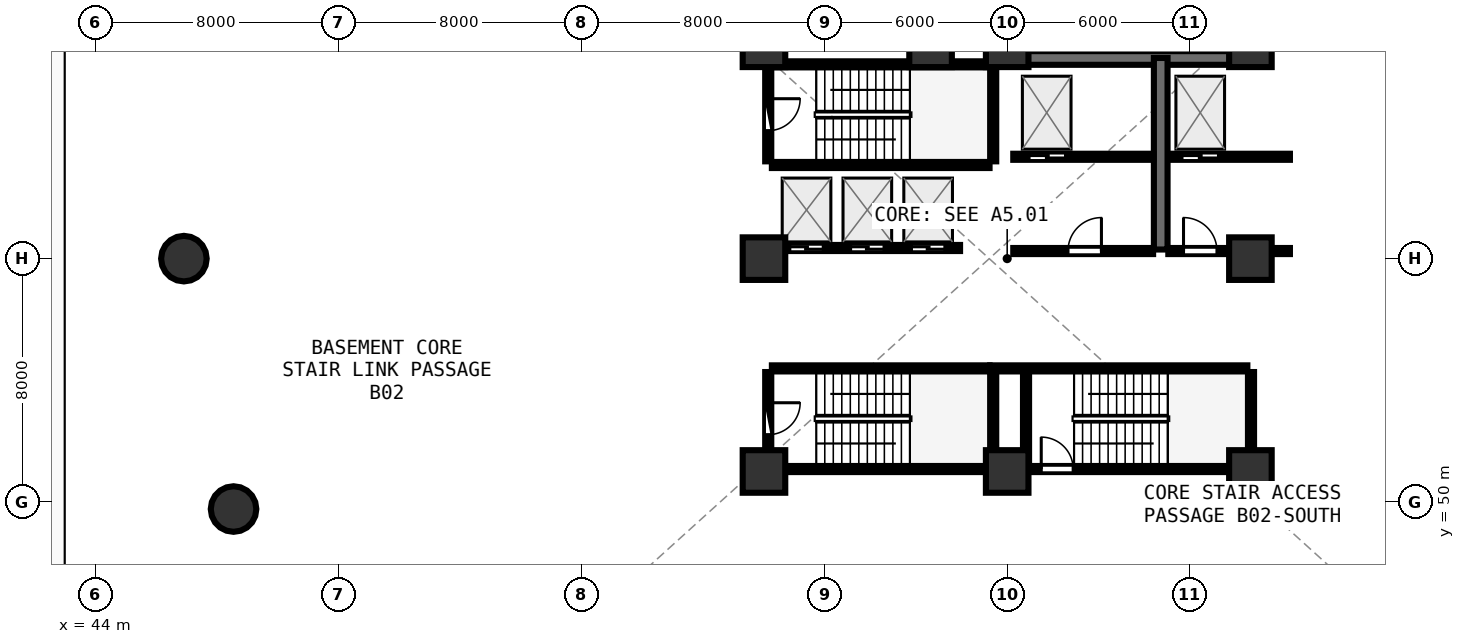
"""IFC4 building model, lengths in metres.
Left out: names, types, materials, properties, quantities, classifications, styles, units other than length and angle.
Written with IfcOpenShell. Run it as: python <this file> out.ifc"""

import sys

from ifc_helpers import new_model, si_unit, direction, frame, frame_2d, origin, origin_2d, place, context, subcontext, project, spatial, rectangle, circle, extrude, element, fill, save


model = new_model("IFC4")
c1 = context("Model", 3, precision=1e-05, world=origin(), true_north=direction((0.0, 1.0)))
c2 = subcontext(c1, "Body", "Model", "MODEL_VIEW")
j1 = project(units=[si_unit("LENGTHUNIT", "METRE"), si_unit("PLANEANGLEUNIT", "RADIAN")], contexts=[c1])
p1 = place(None, origin())
s1 = spatial("IfcSite", under=j1, at=p1, CompositionType="ELEMENT")
p2 = place(p1, origin())
s2 = spatial("IfcBuilding", under=s1, at=p2, CompositionType="ELEMENT")
p3 = place(p2, frame((0.0, 0.0, -8.4)))
s3 = spatial("IfcBuildingStorey", under=s2, at=p3, CompositionType="ELEMENT", Elevation=-8.4)
for number, where, z_axis, x_axis in (
    (1, (66.0, 51.0, 0.0), (0.0, 0.0, 1.0), (1.0, 0.0, 0.0)),
    (2, (74.0, 51.0, 0.0), (0.0, 0.0, 1.0), (1.0, 0.0, 0.0)),
    (3, (82.0, 51.0, 0.0), (0.0, 0.0, 1.0), (1.0, 0.0, 0.0)),
    (4, (82.0, 58.0, 0.0), (0.0, 0.0, 1.0), (1.0, 0.0, 0.0)),
    (5, (82.0, 65.0, 0.0), (0.0, 0.0, 1.0), (1.0, 0.0, 0.0)),
    (6, (74.0, 65.0, 0.0), (0.0, 0.0, 1.0), (1.0, 0.0, 0.0)),
    (7, (71.48, 65.0, 0.0), (0.0, 0.0, 1.0), (1.0, 0.0, 0.0)),
    (8, (66.0, 65.0, 0.0), (0.0, 0.0, 1.0), (1.0, 0.0, 0.0)),
    (9, (66.0, 58.0, 0.0), (0.0, 0.0, 1.0), (1.0, 0.0, 0.0)),
):
    element("IfcColumn", number, at=place(p3, frame(where, z_axis=z_axis, x_axis=x_axis)), inside=s3, PredefinedType="PILASTER", context=c2, shape_type="SweptSolid", body=[
        extrude(rectangle(XDim=1.4, YDim=1.4, at=origin_2d()), origin(), (0.0, 0.0, 1.0), 4.2),
    ])
for number, where, z_axis, x_axis in (
    (10, (46.92, 58.0, 0.0), (0.0, 0.0, 1.0), (1.0, 0.0, 0.0)),
    (11, (48.553, 49.764, 0.0), (0.0, 0.0, 1.0), (1.0, 0.0, 0.0)),
):
    element("IfcColumn", number, at=place(p3, frame(where, z_axis=z_axis, x_axis=x_axis)), inside=s3, PredefinedType="COLUMN", context=c2, shape_type="SweptSolid", body=[
        extrude(circle(Radius=0.75, at=origin_2d()), origin(), (0.0, 0.0, 1.0), 4.2),
    ])
p4 = place(p3, frame((66.26, 61.08, 0.0), z_axis=(0.0, 0.0, 1.0), x_axis=(1.0, 0.0, 0.0)))
e12 = element("IfcWall", 12, at=p4, inside=s3, PredefinedType="SHEAR", context=c2, shape_type="SweptSolid", body=[
    extrude(rectangle(XDim=7.16, YDim=0.2, at=frame_2d((3.58, 0.0))), origin(), (0.0, 0.0, 1.0), 3.9),
])
p5 = place(p3, frame((73.54, 61.2, 0.0), z_axis=(0.0, 0.0, 1.0), x_axis=(0.0, 1.0, 0.0)))
e13 = element("IfcWall", 13, at=p5, inside=s3, PredefinedType="SHEAR", context=c2, shape_type="SweptSolid", body=[
    extrude(rectangle(XDim=3.07, YDim=0.2, at=frame_2d((1.535, 0.0))), origin(), (0.0, 0.0, 1.0), 3.9),
])
p6 = place(p3, frame((73.42, 64.39, 0.0), z_axis=(0.0, 0.0, 1.0), x_axis=(-1.0, 0.0, 0.0)))
e14 = element("IfcWall", 14, at=p6, inside=s3, PredefinedType="SHEAR", context=c2, shape_type="SweptSolid", body=[
    extrude(rectangle(XDim=7.16, YDim=0.2, at=frame_2d((3.58, 0.0))), origin(), (0.0, 0.0, 1.0), 3.9),
])
p7 = place(p3, frame((66.14, 64.27, 0.0), z_axis=(0.0, 0.0, 1.0), x_axis=(0.0, -1.0, 0.0)))
e15 = element("IfcWall", 15, at=p7, inside=s3, PredefinedType="SHEAR", context=c2, shape_type="SweptSolid", body=[
    extrude(rectangle(XDim=3.07, YDim=0.2, at=frame_2d((1.535, 0.0))), origin(), (0.0, 0.0, 1.0), 3.9),
])
p8 = place(p7, frame((1.01, 0.0, 0.0)))
e16 = element("IfcOpeningElement", 16, at=p8, cuts=e15, PredefinedType="OPENING", context=c2, shape_type="SweptSolid", body=[
    extrude(rectangle(XDim=1.05, YDim=2.1, at=frame_2d((0.525, 1.05))), frame((0.0, 0.11, 0.0), z_axis=(0.0, -1.0, 0.0), x_axis=(1.0, 0.0, 0.0)), (0.0, 0.0, 1.0), 0.22),
])
p9 = place(p3, frame((74.0, 51.08, 0.0), z_axis=(0.0, 0.0, 1.0), x_axis=(1.0, 0.0, 0.0)))
e17 = element("IfcWall", 17, at=p9, inside=s3, PredefinedType="SHEAR", context=c2, shape_type="SweptSolid", body=[
    extrude(rectangle(XDim=7.9, YDim=0.2, at=frame_2d((3.95, 0.0))), origin(), (0.0, 0.0, 1.0), 3.9),
])
p10 = place(p9, frame((1.12, 0.0, 0.0)))
e18 = element("IfcOpeningElement", 18, at=p10, cuts=e17, PredefinedType="OPENING", context=c2, shape_type="SweptSolid", body=[
    extrude(rectangle(XDim=1.05, YDim=2.1, at=frame_2d((0.525, 1.05))), frame((0.0, 0.11, 0.0), z_axis=(0.0, -1.0, 0.0), x_axis=(1.0, 0.0, 0.0)), (0.0, 0.0, 1.0), 0.22),
])
p11 = place(p3, frame((82.02, 51.2, 0.0), z_axis=(0.0, 0.0, 1.0), x_axis=(0.0, 1.0, 0.0)))
e19 = element("IfcWall", 19, at=p11, inside=s3, PredefinedType="SHEAR", context=c2, shape_type="SweptSolid", body=[
    extrude(rectangle(XDim=3.07, YDim=0.2, at=frame_2d((1.535, 0.0))), origin(), (0.0, 0.0, 1.0), 3.9),
])
p12 = place(p3, frame((81.9, 54.39, 0.0), z_axis=(0.0, 0.0, 1.0), x_axis=(-1.0, 0.0, 0.0)))
e20 = element("IfcWall", 20, at=p12, inside=s3, PredefinedType="SHEAR", context=c2, shape_type="SweptSolid", body=[
    extrude(rectangle(XDim=8.46, YDim=0.2, at=frame_2d((4.23, 0.0))), origin(), (0.0, 0.0, 1.0), 3.9),
])
p13 = place(p3, frame((74.62, 54.27, 0.0), z_axis=(0.0, 0.0, 1.0), x_axis=(0.0, -1.0, 0.0)))
e21 = element("IfcWall", 21, at=p13, inside=s3, PredefinedType="SHEAR", context=c2, shape_type="SweptSolid", body=[
    extrude(rectangle(XDim=3.07, YDim=0.2, at=frame_2d((1.535, 0.0))), origin(), (0.0, 0.0, 1.0), 3.9),
])
p14 = place(p3, frame((66.26, 51.08, 0.0), z_axis=(0.0, 0.0, 1.0), x_axis=(1.0, 0.0, 0.0)))
e22 = element("IfcWall", 22, at=p14, inside=s3, PredefinedType="SHEAR", context=c2, shape_type="SweptSolid", body=[
    extrude(rectangle(XDim=7.16, YDim=0.2, at=frame_2d((3.58, 0.0))), origin(), (0.0, 0.0, 1.0), 3.9),
])
p15 = place(p3, frame((73.54, 51.2, 0.0), z_axis=(0.0, 0.0, 1.0), x_axis=(0.0, 1.0, 0.0)))
e23 = element("IfcWall", 23, at=p15, inside=s3, PredefinedType="SHEAR", context=c2, shape_type="SweptSolid", body=[
    extrude(rectangle(XDim=3.07, YDim=0.2, at=frame_2d((1.535, 0.0))), origin(), (0.0, 0.0, 1.0), 3.9),
])
p16 = place(p3, frame((73.42, 54.39, 0.0), z_axis=(0.0, 0.0, 1.0), x_axis=(-1.0, 0.0, 0.0)))
e24 = element("IfcWall", 24, at=p16, inside=s3, PredefinedType="SHEAR", context=c2, shape_type="SweptSolid", body=[
    extrude(rectangle(XDim=7.16, YDim=0.2, at=frame_2d((3.58, 0.0))), origin(), (0.0, 0.0, 1.0), 3.9),
])
p17 = place(p3, frame((66.14, 54.27, 0.0), z_axis=(0.0, 0.0, 1.0), x_axis=(0.0, -1.0, 0.0)))
e25 = element("IfcWall", 25, at=p17, inside=s3, PredefinedType="SHEAR", context=c2, shape_type="SweptSolid", body=[
    extrude(rectangle(XDim=3.07, YDim=0.2, at=frame_2d((1.535, 0.0))), origin(), (0.0, 0.0, 1.0), 3.9),
])
p18 = place(p17, frame((1.01, 0.0, 0.0)))
e26 = element("IfcOpeningElement", 26, at=p18, cuts=e25, PredefinedType="OPENING", context=c2, shape_type="SweptSolid", body=[
    extrude(rectangle(XDim=1.05, YDim=2.1, at=frame_2d((0.525, 1.05))), frame((0.0, 0.11, 0.0), z_axis=(0.0, -1.0, 0.0), x_axis=(1.0, 0.0, 0.0)), (0.0, 0.0, 1.0), 0.22),
])
p19 = place(p3, frame((74.0, 64.6, 0.0), z_axis=(0.0, 0.0, 1.0), x_axis=(1.0, 0.0, 0.0)))
e27 = element("IfcWall", 27, at=p19, inside=s3, PredefinedType="SHEAR", context=c2, shape_type="SweptSolid", body=[
    extrude(rectangle(XDim=8.0, YDim=0.45, at=frame_2d((4.0, 0.0))), origin(), (0.0, 0.0, 1.0), 3.9),
])
p20 = place(p3, frame((79.05, 58.3, 0.0), z_axis=(0.0, 0.0, 1.0), x_axis=(0.0, 1.0, 0.0)))
e28 = element("IfcWall", 28, at=p20, inside=s3, PredefinedType="SHEAR", context=c2, shape_type="SweptSolid", body=[
    extrude(rectangle(XDim=6.3, YDim=0.45, at=frame_2d((3.15, 0.0))), origin(), (0.0, 0.0, 1.0), 3.9),
])
p21 = place(p3, frame((74.2, 61.35, 0.0), z_axis=(0.0, 0.0, 1.0), x_axis=(1.0, 0.0, 0.0)))
e29 = element("IfcWall", 29, at=p21, inside=s3, PredefinedType="SOLIDWALL", context=c2, shape_type="SweptSolid", body=[
    extrude(rectangle(XDim=4.6, YDim=0.2, at=frame_2d((2.3, 0.0))), origin(), (0.0, 0.0, 1.0), 3.89),
])
p22 = place(p21, frame((0.52, 0.0, 0.0)))
e30 = element("IfcOpeningElement", 30, at=p22, cuts=e29, PredefinedType="OPENING", context=c2, shape_type="SweptSolid", body=[
    extrude(rectangle(XDim=1.2, YDim=2.15, at=frame_2d((0.6, 1.075))), frame((0.0, 0.11, 0.0), z_axis=(0.0, -1.0, 0.0), x_axis=(1.0, 0.0, 0.0)), (0.0, 0.0, 1.0), 0.22),
])
p23 = place(p3, frame((79.3, 61.35, 0.0), z_axis=(0.0, 0.0, 1.0), x_axis=(1.0, 0.0, 0.0)))
e31 = element("IfcWall", 31, at=p23, inside=s3, PredefinedType="SOLIDWALL", context=c2, shape_type="SweptSolid", body=[
    extrude(rectangle(XDim=4.0, YDim=0.2, at=frame_2d((2.0, 0.0))), origin(), (0.0, 0.0, 1.0), 3.185),
])
p24 = place(p23, frame((0.45, 0.0, 0.0)))
e32 = element("IfcOpeningElement", 32, at=p24, cuts=e31, PredefinedType="OPENING", context=c2, shape_type="SweptSolid", body=[
    extrude(rectangle(XDim=1.2, YDim=2.15, at=frame_2d((0.6, 1.075))), frame((0.0, 0.11, 0.0), z_axis=(0.0, -1.0, 0.0), x_axis=(1.0, 0.0, 0.0)), (0.0, 0.0, 1.0), 0.22),
])
p25 = place(p3, frame((74.2, 58.25, 0.0), z_axis=(0.0, 0.0, 1.0), x_axis=(1.0, 0.0, 0.0)))
e33 = element("IfcWall", 33, at=p25, inside=s3, PredefinedType="SOLIDWALL", context=c2, shape_type="SweptSolid", body=[
    extrude(rectangle(XDim=4.6, YDim=0.2, at=frame_2d((2.3, 0.0))), origin(), (0.0, 0.0, 1.0), 3.89),
])
p26 = place(p25, frame((1.8, 0.0, 0.0)))
e34 = element("IfcOpeningElement", 34, at=p26, cuts=e33, PredefinedType="OPENING", context=c2, shape_type="SweptSolid", body=[
    extrude(rectangle(XDim=1.1, YDim=2.1, at=frame_2d((0.55, 1.05))), frame((0.0, 0.11, 0.0), z_axis=(0.0, -1.0, 0.0), x_axis=(1.0, 0.0, 0.0)), (0.0, 0.0, 1.0), 0.22),
])
p27 = place(p3, frame((79.3, 58.25, 0.0), z_axis=(0.0, 0.0, 1.0), x_axis=(1.0, 0.0, 0.0)))
e35 = element("IfcWall", 35, at=p27, inside=s3, PredefinedType="SOLIDWALL", context=c2, shape_type="SweptSolid", body=[
    extrude(rectangle(XDim=4.0, YDim=0.2, at=frame_2d((2.0, 0.0))), origin(), (0.0, 0.0, 1.0), 3.185),
])
p28 = place(p27, frame((0.5, 0.0, 0.0)))
e36 = element("IfcOpeningElement", 36, at=p28, cuts=e35, PredefinedType="OPENING", context=c2, shape_type="SweptSolid", body=[
    extrude(rectangle(XDim=1.1, YDim=2.1, at=frame_2d((0.55, 1.05))), frame((0.0, 0.11, 0.0), z_axis=(0.0, -1.0, 0.0), x_axis=(1.0, 0.0, 0.0)), (0.0, 0.0, 1.0), 0.22),
])
p29 = place(p3, frame((66.45, 58.35, 0.0), z_axis=(0.0, 0.0, 1.0), x_axis=(1.0, 0.0, 0.0)))
e37 = element("IfcWall", 37, at=p29, inside=s3, PredefinedType="SOLIDWALL", context=c2, shape_type="SweptSolid", body=[
    extrude(rectangle(XDim=6.0, YDim=0.2, at=frame_2d((3.0, 0.0))), origin(), (0.0, 0.0, 1.0), 3.89),
])
p30 = place(p29, frame((0.4, 0.0, 0.0)))
e38 = element("IfcOpeningElement", 38, at=p30, cuts=e37, PredefinedType="OPENING", context=c2, shape_type="SweptSolid", body=[
    extrude(rectangle(XDim=1.1, YDim=2.1, at=frame_2d((0.55, 1.05))), frame((0.0, 0.11, 0.0), z_axis=(0.0, -1.0, 0.0), x_axis=(1.0, 0.0, 0.0)), (0.0, 0.0, 1.0), 0.22),
])
p31 = place(p29, frame((2.4, 0.0, 0.0)))
e39 = element("IfcOpeningElement", 39, at=p31, cuts=e37, PredefinedType="OPENING", context=c2, shape_type="SweptSolid", body=[
    extrude(rectangle(XDim=1.1, YDim=2.1, at=frame_2d((0.55, 1.05))), frame((0.0, 0.11, 0.0), z_axis=(0.0, -1.0, 0.0), x_axis=(1.0, 0.0, 0.0)), (0.0, 0.0, 1.0), 0.22),
])
p32 = place(p29, frame((4.4, 0.0, 0.0)))
e40 = element("IfcOpeningElement", 40, at=p32, cuts=e37, PredefinedType="OPENING", context=c2, shape_type="SweptSolid", body=[
    extrude(rectangle(XDim=1.1, YDim=2.1, at=frame_2d((0.55, 1.05))), frame((0.0, 0.11, 0.0), z_axis=(0.0, -1.0, 0.0), x_axis=(1.0, 0.0, 0.0)), (0.0, 0.0, 1.0), 0.22),
])
p33 = place(p8, origin())
e41 = element("IfcDoor", 41, at=p33, inside=s3, OperationType="SINGLE_SWING_LEFT", PredefinedType="DOOR", context=c2, shape_type="SweptSolid", body=[
    extrude(rectangle(XDim=1.05, YDim=2.1, at=frame_2d((0.525, 1.05))), frame((0.0, 0.025, 0.0), z_axis=(0.0, -1.0, 0.0), x_axis=(1.0, 0.0, 0.0)), (0.0, 0.0, 1.0), 0.05),
])
fill(e16, e41)
p34 = place(p10, origin())
e42 = element("IfcDoor", 42, at=p34, inside=s3, OperationType="SINGLE_SWING_LEFT", PredefinedType="DOOR", context=c2, shape_type="SweptSolid", body=[
    extrude(rectangle(XDim=1.05, YDim=2.1, at=frame_2d((0.525, 1.05))), frame((0.0, 0.025, 0.0), z_axis=(0.0, -1.0, 0.0), x_axis=(1.0, 0.0, 0.0)), (0.0, 0.0, 1.0), 0.05),
])
fill(e18, e42)
p35 = place(p18, origin())
e43 = element("IfcDoor", 43, at=p35, inside=s3, OperationType="SINGLE_SWING_LEFT", PredefinedType="DOOR", context=c2, shape_type="SweptSolid", body=[
    extrude(rectangle(XDim=1.05, YDim=2.1, at=frame_2d((0.525, 1.05))), frame((0.0, 0.025, 0.0), z_axis=(0.0, -1.0, 0.0), x_axis=(1.0, 0.0, 0.0)), (0.0, 0.0, 1.0), 0.05),
])
fill(e26, e43)
p36 = place(p22, origin())
e44 = element("IfcDoor", 44, at=p36, inside=s3, OperationType="DOUBLE_DOOR_SLIDING", PredefinedType="DOOR", context=c2, shape_type="SweptSolid", body=[
    extrude(rectangle(XDim=1.2, YDim=2.15, at=frame_2d((0.6, 1.075))), frame((0.0, 0.025, 0.0), z_axis=(0.0, -1.0, 0.0), x_axis=(1.0, 0.0, 0.0)), (0.0, 0.0, 1.0), 0.05),
])
fill(e30, e44)
p37 = place(p24, origin())
e45 = element("IfcDoor", 45, at=p37, inside=s3, OperationType="DOUBLE_DOOR_SLIDING", PredefinedType="DOOR", context=c2, shape_type="SweptSolid", body=[
    extrude(rectangle(XDim=1.2, YDim=2.15, at=frame_2d((0.6, 1.075))), frame((0.0, 0.025, 0.0), z_axis=(0.0, -1.0, 0.0), x_axis=(1.0, 0.0, 0.0)), (0.0, 0.0, 1.0), 0.05),
])
fill(e32, e45)
p38 = place(p26, frame((1.1, 0.0, 0.0), z_axis=(0.0, 0.0, 1.0), x_axis=(-1.0, 0.0, 0.0)))
e46 = element("IfcDoor", 46, at=p38, inside=s3, OperationType="SINGLE_SWING_LEFT", PredefinedType="DOOR", context=c2, shape_type="SweptSolid", body=[
    extrude(rectangle(XDim=1.1, YDim=2.1, at=frame_2d((0.55, 1.05))), frame((0.0, 0.025, 0.0), z_axis=(0.0, -1.0, 0.0), x_axis=(1.0, 0.0, 0.0)), (0.0, 0.0, 1.0), 0.05),
])
fill(e34, e46)
p39 = place(p28, frame((1.1, 0.0, 0.0), z_axis=(0.0, 0.0, 1.0), x_axis=(-1.0, 0.0, 0.0)))
e47 = element("IfcDoor", 47, at=p39, inside=s3, OperationType="SINGLE_SWING_RIGHT", PredefinedType="DOOR", context=c2, shape_type="SweptSolid", body=[
    extrude(rectangle(XDim=1.1, YDim=2.1, at=frame_2d((0.55, 1.05))), frame((0.0, 0.025, 0.0), z_axis=(0.0, -1.0, 0.0), x_axis=(1.0, 0.0, 0.0)), (0.0, 0.0, 1.0), 0.05),
])
fill(e36, e47)
p40 = place(p30, origin())
e48 = element("IfcDoor", 48, at=p40, inside=s3, OperationType="DOUBLE_DOOR_SLIDING", PredefinedType="DOOR", context=c2, shape_type="SweptSolid", body=[
    extrude(rectangle(XDim=1.1, YDim=2.1, at=frame_2d((0.55, 1.05))), frame((0.0, 0.025, 0.0), z_axis=(0.0, -1.0, 0.0), x_axis=(1.0, 0.0, 0.0)), (0.0, 0.0, 1.0), 0.05),
])
fill(e38, e48)
p41 = place(p31, origin())
e49 = element("IfcDoor", 49, at=p41, inside=s3, OperationType="DOUBLE_DOOR_SLIDING", PredefinedType="DOOR", context=c2, shape_type="SweptSolid", body=[
    extrude(rectangle(XDim=1.1, YDim=2.1, at=frame_2d((0.55, 1.05))), frame((0.0, 0.025, 0.0), z_axis=(0.0, -1.0, 0.0), x_axis=(1.0, 0.0, 0.0)), (0.0, 0.0, 1.0), 0.05),
])
fill(e39, e49)
p42 = place(p32, origin())
e50 = element("IfcDoor", 50, at=p42, inside=s3, OperationType="DOUBLE_DOOR_SLIDING", PredefinedType="DOOR", context=c2, shape_type="SweptSolid", body=[
    extrude(rectangle(XDim=1.1, YDim=2.1, at=frame_2d((0.55, 1.05))), frame((0.0, 0.025, 0.0), z_axis=(0.0, -1.0, 0.0), x_axis=(1.0, 0.0, 0.0)), (0.0, 0.0, 1.0), 0.05),
])
fill(e40, e50)
save(model, sys.argv[1])
